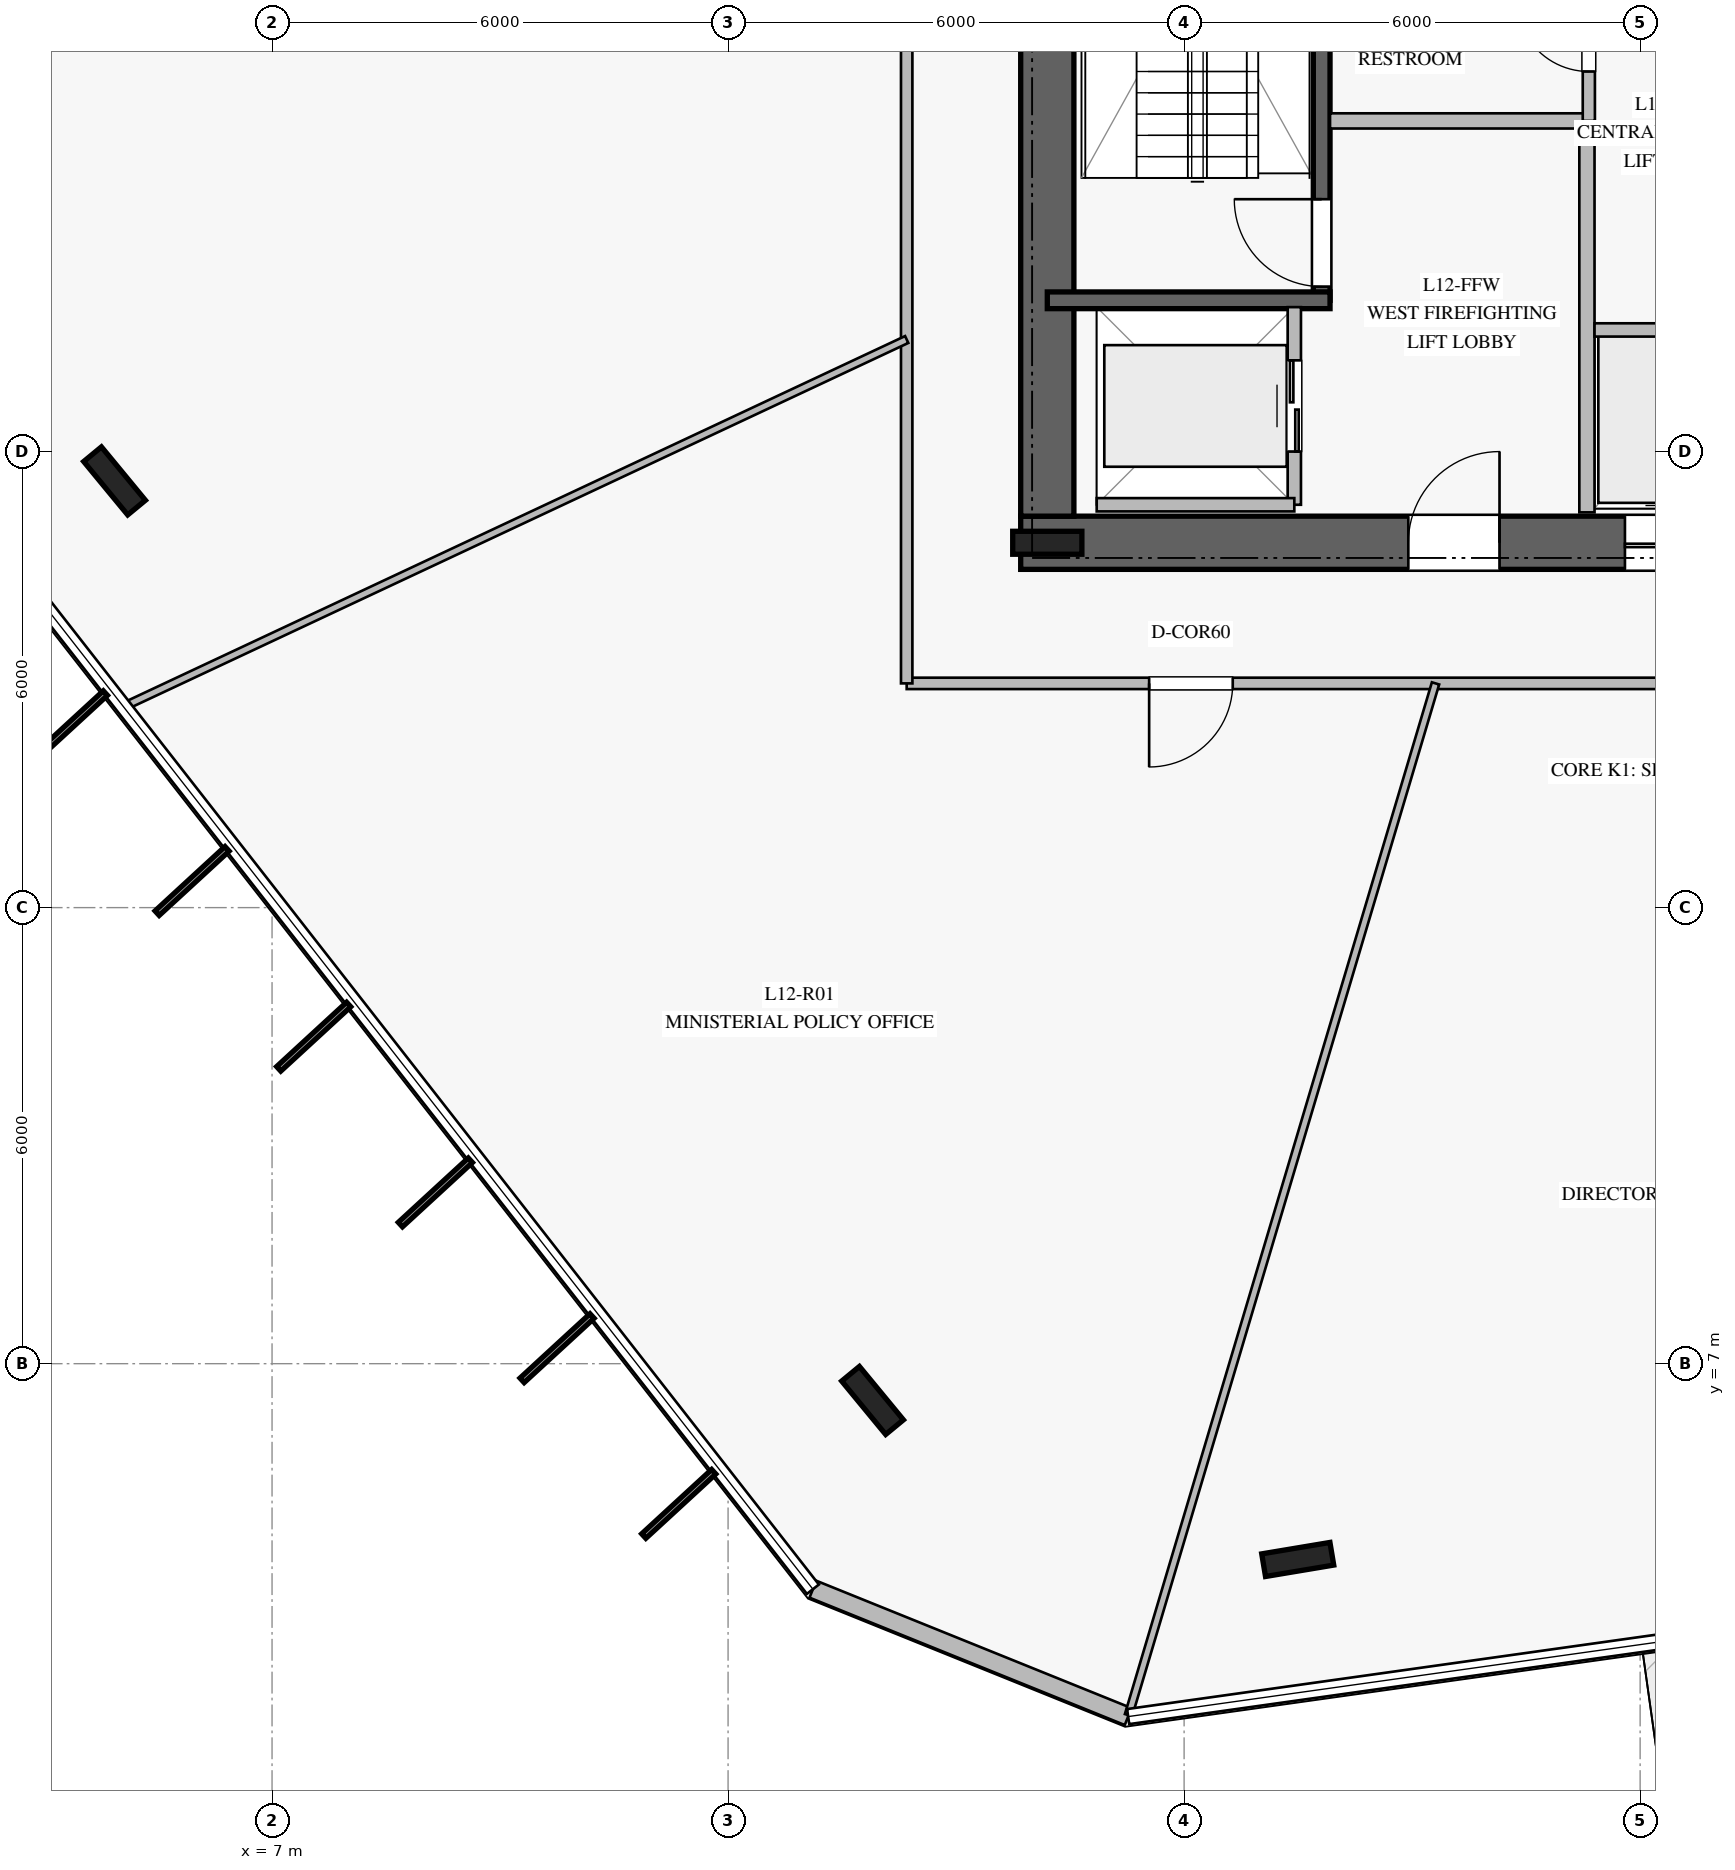
"""IFC4 building model, lengths in metres.
Left out: names, types, materials, properties, quantities, classifications, styles, units other than length and angle.
Written with IfcOpenShell. Run it as: python <this file> out.ifc"""

import sys

from ifc_helpers import new_model, si_unit, direction, frame, frame_2d, origin, origin_2d, place, context, subcontext, project, spatial, rectangle, i_section, extrude, element, fill, save


model = new_model("IFC4")
c1 = context("Model", 3, precision=1e-05, world=origin(), true_north=direction((0.0, 1.0)))
c2 = subcontext(c1, "Body", "Model", "MODEL_VIEW")
j1 = project(units=[si_unit("LENGTHUNIT", "METRE"), si_unit("PLANEANGLEUNIT", "RADIAN")], contexts=[c1])
p1 = place(None, origin())
s1 = spatial("IfcSite", under=j1, at=p1, CompositionType="ELEMENT")
p2 = place(p1, origin())
s2 = spatial("IfcBuilding", under=s1, at=p2, CompositionType="ELEMENT")
p3 = place(p2, frame((0.0, 0.0, 52.0)))
s3 = spatial("IfcBuildingStorey", under=s2, at=p3, CompositionType="ELEMENT", Elevation=52.0)
p4 = place(p3, frame((16.85, 17.8, 0.0), z_axis=(0.0, 0.0, 1.0), x_axis=(1.0, 0.0, 0.0)))
e1 = element("IfcWall", 1, at=p4, inside=s3, PredefinedType="SHEAR", context=c2, shape_type="SweptSolid", body=[
    extrude(rectangle(XDim=16.3, YDim=0.7, at=frame_2d((8.15, 0.0))), origin(), (0.0, 0.0, 1.0), 3.76),
])
p5 = place(p4, frame((5.1, 0.0, 0.0)))
e2 = element("IfcOpeningElement", 2, at=p5, cuts=e1, PredefinedType="OPENING", context=c2, shape_type="SweptSolid", body=[
    extrude(rectangle(XDim=1.2, YDim=2.25, at=frame_2d((0.6, 1.125))), frame((0.0, 0.36, 0.0), z_axis=(0.0, -1.0, 0.0), x_axis=(1.0, 0.0, 0.0)), (0.0, 0.0, 1.0), 0.72),
])
p6 = place(p4, frame((14.05, 0.0, 0.0)))
e3 = element("IfcOpeningElement", 3, at=p6, cuts=e1, PredefinedType="OPENING", context=c2, shape_type="SweptSolid", body=[
    extrude(rectangle(XDim=0.9, YDim=2.1, at=frame_2d((0.45, 1.05))), frame((0.0, 0.36, 0.0), z_axis=(0.0, -1.0, 0.0), x_axis=(1.0, 0.0, 0.0)), (0.0, 0.0, 1.0), 0.72),
])
p7 = place(p4, frame((7.95, 0.0, 0.0)))
e4 = element("IfcOpeningElement", 4, at=p7, cuts=e1, PredefinedType="OPENING", context=c2, shape_type="SweptSolid", body=[
    extrude(rectangle(XDim=1.1, YDim=2.2, at=frame_2d((0.55, 1.1))), frame((0.0, 0.36, 0.0), z_axis=(0.0, -1.0, 0.0), x_axis=(1.0, 0.0, 0.0)), (0.0, 0.0, 1.0), 0.72),
])
p8 = place(p4, frame((9.925, 0.0, 0.0)))
e5 = element("IfcOpeningElement", 5, at=p8, cuts=e1, PredefinedType="OPENING", context=c2, shape_type="SweptSolid", body=[
    extrude(rectangle(XDim=1.1, YDim=2.2, at=frame_2d((0.55, 1.1))), frame((0.0, 0.36, 0.0), z_axis=(0.0, -1.0, 0.0), x_axis=(1.0, 0.0, 0.0)), (0.0, 0.0, 1.0), 0.72),
])
p9 = place(p4, frame((11.9, 0.0, 0.0)))
e6 = element("IfcOpeningElement", 6, at=p9, cuts=e1, PredefinedType="OPENING", context=c2, shape_type="SweptSolid", body=[
    extrude(rectangle(XDim=1.1, YDim=2.2, at=frame_2d((0.55, 1.1))), frame((0.0, 0.36, 0.0), z_axis=(0.0, -1.0, 0.0), x_axis=(1.0, 0.0, 0.0)), (0.0, 0.0, 1.0), 0.72),
])
p10 = place(p3, frame((17.2, 31.85, 0.0), z_axis=(0.0, 0.0, 1.0), x_axis=(0.0, -1.0, 0.0)))
e7 = element("IfcWall", 7, at=p10, inside=s3, PredefinedType="SHEAR", context=c2, shape_type="SweptSolid", body=[
    extrude(rectangle(XDim=13.7, YDim=0.7, at=frame_2d((6.85, 0.0))), origin(), (0.0, 0.0, 1.0), 3.76),
])
p11 = place(p10, frame((2.0, 0.0, 0.0)))
e8 = element("IfcOpeningElement", 8, at=p11, cuts=e7, PredefinedType="OPENING", context=c2, shape_type="SweptSolid", body=[
    extrude(rectangle(XDim=1.5, YDim=2.2, at=frame_2d((0.75, 1.1))), frame((0.0, 0.36, 0.0), z_axis=(0.0, -1.0, 0.0), x_axis=(1.0, 0.0, 0.0)), (0.0, 0.0, 1.0), 0.72),
])
p12 = place(p3, frame((17.2, 17.8, 0.0), z_axis=(0.0, 0.0, 1.0), x_axis=(1.0, 0.0, 0.0)))
e9 = element("IfcColumn", 9, at=p12, inside=s3, PredefinedType="COLUMN", context=c2, shape_type="SweptSolid", body=[
    extrude(i_section(OverallWidth=0.302, OverallDepth=0.91, WebThickness=0.021, FlangeThickness=0.04, at=origin_2d()), origin(), (0.0, 0.0, 1.0), 4.0),
])
p13 = place(p3, frame((20.81, 20.99, 0.0), z_axis=(0.0, 0.0, 1.0), x_axis=(0.0, 1.0, 0.0)))
e10 = element("IfcWall", 10, at=p13, inside=s3, PredefinedType="SOLIDWALL", context=c2, shape_type="SweptSolid", body=[
    extrude(rectangle(XDim=7.22, YDim=0.22, at=frame_2d((3.61, 0.0))), origin(), (0.0, 0.0, 1.0), 3.76),
])
p14 = place(p13, frame((0.18, 0.0, 0.0)))
e11 = element("IfcOpeningElement", 11, at=p14, cuts=e10, PredefinedType="OPENING", context=c2, shape_type="SweptSolid", body=[
    extrude(rectangle(XDim=1.15, YDim=2.2, at=frame_2d((0.575, 1.1))), frame((0.0, 0.12, 0.0), z_axis=(0.0, -1.0, 0.0), x_axis=(1.0, 0.0, 0.0)), (0.0, 0.0, 1.0), 0.24),
])
p15 = place(p3, frame((17.2, 20.99, 0.0), z_axis=(0.0, 0.0, 1.0), x_axis=(1.0, 0.0, 0.0)))
e12 = element("IfcWall", 12, at=p15, inside=s3, PredefinedType="SOLIDWALL", context=c2, shape_type="SweptSolid", body=[
    extrude(rectangle(XDim=3.72, YDim=0.22, at=frame_2d((1.86, 0.0))), origin(), (0.0, 0.0, 1.0), 3.76),
])
for number, where, z_axis, x_axis in (
    (13, (3.943, 24.504, 0.0), (0.0, 0.0, 1.0), (0.35, 0.937, 0.0)),
    (14, (4.928, 18.614, 0.0), (0.0, 0.0, 1.0), (-0.636, 0.772, 0.0)),
    (15, (14.901, 6.516, 0.0), (0.0, 0.0, 1.0), (-0.636, 0.772, 0.0)),
    (16, (20.495, 4.424, 0.0), (0.0, 0.0, 1.0), (0.986, 0.165, 0.0)),
):
    element("IfcColumn", number, at=place(p3, frame(where, z_axis=z_axis, x_axis=x_axis)), inside=s3, PredefinedType="COLUMN", context=c2, shape_type="SweptSolid", body=[
        extrude(i_section(OverallWidth=0.302, OverallDepth=0.91, WebThickness=0.021, FlangeThickness=0.04, at=origin_2d()), origin(), (0.0, 0.0, 1.0), 4.0),
    ])
p16 = place(p3, frame((14.116, 4.033, 0.0), z_axis=(0.0, 0.0, 1.0), x_axis=(0.927172587255, -0.374634479783, 0.0)))
e17 = element("IfcWall", 17, at=p16, inside=s3, PredefinedType="STANDARD", context=c2, shape_type="SweptSolid", body=[
    extrude(rectangle(XDim=4.474, YDim=0.24, at=frame_2d((2.237, 0.0))), origin(), (0.0, 0.0, 1.0), 3.76),
])
p17 = place(p3, frame((24.3, 18.2, 0.0), z_axis=(0.0, 0.0, 1.0), x_axis=(0.0, 1.0, 0.0)))
e18 = element("IfcWall", 18, at=p17, inside=s3, PredefinedType="PARTITIONING", context=c2, shape_type="SweptSolid", body=[
    extrude(rectangle(XDim=5.15, YDim=0.2, at=frame_2d((2.575, 0.0))), origin(), (0.0, 0.0, 1.0), 3.76),
])
p18 = place(p3, frame((20.92, 23.35, 0.0), z_axis=(0.0, 0.0, 1.0), x_axis=(1.0, 0.0, 0.0)))
e19 = element("IfcWall", 19, at=p18, inside=s3, PredefinedType="PARTITIONING", context=c2, shape_type="SweptSolid", body=[
    extrude(rectangle(XDim=3.38, YDim=0.2, at=frame_2d((1.69, 0.0))), origin(), (0.0, 0.0, 1.0), 3.76),
])
p19 = place(p3, frame((24.325, 23.35, 0.0), z_axis=(0.0, 0.0, 1.0), x_axis=(0.0, 1.0, 0.0)))
e20 = element("IfcWall", 20, at=p19, inside=s3, PredefinedType="PLUMBINGWALL", context=c2, shape_type="SweptSolid", body=[
    extrude(rectangle(XDim=4.93, YDim=0.16, at=frame_2d((2.465, 0.0))), origin(), (0.0, 0.0, 1.0), 3.76),
])
p20 = place(p19, frame((0.65, 0.0, 0.0)))
e21 = element("IfcOpeningElement", 21, at=p20, cuts=e20, PredefinedType="OPENING", context=c2, shape_type="SweptSolid", body=[
    extrude(rectangle(XDim=0.95, YDim=2.1, at=frame_2d((0.475, 1.05))), frame((0.0, 0.09, 0.0), z_axis=(0.0, -1.0, 0.0), x_axis=(1.0, 0.0, 0.0)), (0.0, 0.0, 1.0), 0.18),
])
p21 = place(p19, frame((3.11, 0.0, 0.0)))
e22 = element("IfcOpeningElement", 22, at=p21, cuts=e20, PredefinedType="OPENING", context=c2, shape_type="SweptSolid", body=[
    extrude(rectangle(XDim=0.9, YDim=2.1, at=frame_2d((0.45, 1.05))), frame((0.0, 0.09, 0.0), z_axis=(0.0, -1.0, 0.0), x_axis=(1.0, 0.0, 0.0)), (0.0, 0.0, 1.0), 0.18),
])
p22 = place(p3, frame((24.4, 20.6, 0.0), z_axis=(0.0, 0.0, 1.0), x_axis=(1.0, 0.0, 0.0)))
e23 = element("IfcWall", 23, at=p22, inside=s3, PredefinedType="PARTITIONING", context=c2, shape_type="SweptSolid", body=[
    extrude(rectangle(XDim=1.9, YDim=0.175, at=frame_2d((0.95, 0.0))), origin(), (0.0, 0.0, 1.0), 3.76),
])
p23 = place(p3, frame((20.45, 18.3, 0.0), z_axis=(0.0, 0.0, 1.0), x_axis=(0.0, 1.0, 0.0)))
e24 = element("IfcWall", 24, at=p23, inside=s3, PredefinedType="PARTITIONING", context=c2, shape_type="SweptSolid", body=[
    extrude(rectangle(XDim=2.6, YDim=0.175, at=frame_2d((1.3, 0.0))), origin(), (0.0, 0.0, 1.0), 3.76),
])
p24 = place(p23, frame((0.7, 0.0, 0.0)))
e25 = element("IfcOpeningElement", 25, at=p24, cuts=e24, PredefinedType="OPENING", context=c2, shape_type="SweptSolid", body=[
    extrude(rectangle(XDim=1.2, YDim=2.2, at=frame_2d((0.6, 1.1))), frame((0.0, 0.098, 0.0), z_axis=(0.0, -1.0, 0.0), x_axis=(1.0, 0.0, 0.0)), (0.0, 0.0, 1.0), 0.195),
])
p25 = place(p3, frame((17.85, 18.3, 0.0), z_axis=(0.0, 0.0, 1.0), x_axis=(1.0, 0.0, 0.0)))
e26 = element("IfcWall", 26, at=p25, inside=s3, PredefinedType="PARTITIONING", context=c2, shape_type="SweptSolid", body=[
    extrude(rectangle(XDim=2.6, YDim=0.175, at=frame_2d((1.3, 0.0))), origin(), (0.0, 0.0, 1.0), 3.76),
])
p26 = place(p3, frame((34.65, 15.95, 0.0), z_axis=(0.0, 0.0, 1.0), x_axis=(-1.0, 0.0, 0.0)))
e27 = element("IfcWall", 27, at=p26, inside=s3, PredefinedType="PARTITIONING", context=c2, shape_type="SweptSolid", body=[
    extrude(rectangle(XDim=19.3, YDim=0.15, at=frame_2d((9.65, 0.0))), origin(), (0.0, 0.0, 1.0), 3.21),
])
p27 = place(p26, frame((15.01, 0.0, 0.0)))
e28 = element("IfcOpeningElement", 28, at=p27, cuts=e27, PredefinedType="OPENING", context=c2, shape_type="SweptSolid", body=[
    extrude(rectangle(XDim=1.1, YDim=2.2, at=frame_2d((0.55, 1.1))), frame((0.0, 0.085, 0.0), z_axis=(0.0, -1.0, 0.0), x_axis=(1.0, 0.0, 0.0)), (0.0, 0.0, 1.0), 0.17),
])
p28 = place(p26, frame((6.126, 0.0, 0.0)))
e29 = element("IfcOpeningElement", 29, at=p28, cuts=e27, PredefinedType="OPENING", context=c2, shape_type="SweptSolid", body=[
    extrude(rectangle(XDim=1.1, YDim=2.2, at=frame_2d((0.55, 1.1))), frame((0.0, 0.085, 0.0), z_axis=(0.0, -1.0, 0.0), x_axis=(1.0, 0.0, 0.0)), (0.0, 0.0, 1.0), 0.17),
])
p29 = place(p3, frame((15.35, 15.95, 0.0), z_axis=(0.0, 0.0, 1.0), x_axis=(0.0, 1.0, 0.0)))
e30 = element("IfcWall", 30, at=p29, inside=s3, PredefinedType="PARTITIONING", context=c2, shape_type="SweptSolid", body=[
    extrude(rectangle(XDim=18.1, YDim=0.15, at=frame_2d((9.05, 0.0))), origin(), (0.0, 0.0, 1.0), 3.21),
])
p30 = place(p29, frame((9.612, 0.0, 0.0)))
e31 = element("IfcOpeningElement", 31, at=p30, cuts=e30, PredefinedType="OPENING", context=c2, shape_type="SweptSolid", body=[
    extrude(rectangle(XDim=1.1, YDim=2.2, at=frame_2d((0.55, 1.1))), frame((0.0, 0.085, 0.0), z_axis=(0.0, -1.0, 0.0), x_axis=(1.0, 0.0, 0.0)), (0.0, 0.0, 1.0), 0.17),
])
p31 = place(p3, frame((15.35, 20.474, 0.0), z_axis=(0.0, 0.0, 1.0), x_axis=(-0.905402160526, -0.42455497608, 0.0)))
e32 = element("IfcWall", 32, at=p31, inside=s3, PredefinedType="MOVABLE", context=c2, shape_type="SweptSolid", body=[
    extrude(rectangle(XDim=11.363, YDim=0.1, at=frame_2d((5.682, 0.0))), origin(), (0.0, 0.0, 1.0), 3.06),
])
p32 = place(p3, frame((22.308, 15.95, 0.0), z_axis=(0.0, 0.0, 1.0), x_axis=(-0.285200995496, -0.958467731417, 0.0)))
e33 = element("IfcWall", 33, at=p32, inside=s3, PredefinedType="MOVABLE", context=c2, shape_type="SweptSolid", body=[
    extrude(rectangle(XDim=14.162, YDim=0.1, at=frame_2d((7.081, 0.0))), origin(), (0.0, 0.0, 1.0), 3.06),
])
p33 = place(p14, origin())
e34 = element("IfcDoor", 34, at=p33, inside=s3, OperationType="SINGLE_SWING_RIGHT", PredefinedType="DOOR", context=c2, shape_type="SweptSolid", body=[
    extrude(rectangle(XDim=1.15, YDim=2.2, at=frame_2d((0.575, 1.1))), frame((0.0, 0.025, 0.0), z_axis=(0.0, -1.0, 0.0), x_axis=(1.0, 0.0, 0.0)), (0.0, 0.0, 1.0), 0.05),
])
fill(e11, e34)
p34 = place(p5, origin())
e35 = element("IfcDoor", 35, at=p34, inside=s3, OperationType="SINGLE_SWING_RIGHT", PredefinedType="DOOR", context=c2, shape_type="SweptSolid", body=[
    extrude(rectangle(XDim=1.2, YDim=2.25, at=frame_2d((0.6, 1.125))), frame((0.0, 0.025, 0.0), z_axis=(0.0, -1.0, 0.0), x_axis=(1.0, 0.0, 0.0)), (0.0, 0.0, 1.0), 0.05),
])
fill(e2, e35)
p35 = place(p20, origin())
e36 = element("IfcDoor", 36, at=p35, inside=s3, OperationType="SINGLE_SWING_RIGHT", PredefinedType="DOOR", context=c2, shape_type="SweptSolid", body=[
    extrude(rectangle(XDim=0.95, YDim=2.1, at=frame_2d((0.475, 1.05))), frame((0.0, 0.025, 0.0), z_axis=(0.0, -1.0, 0.0), x_axis=(1.0, 0.0, 0.0)), (0.0, 0.0, 1.0), 0.05),
])
fill(e21, e36)
p36 = place(p7, origin())
e37 = element("IfcDoor", 37, at=p36, inside=s3, OperationType="DOUBLE_DOOR_SLIDING", PredefinedType="DOOR", context=c2, shape_type="SweptSolid", body=[
    extrude(rectangle(XDim=1.1, YDim=2.2, at=frame_2d((0.55, 1.1))), frame((0.0, 0.025, 0.0), z_axis=(0.0, -1.0, 0.0), x_axis=(1.0, 0.0, 0.0)), (0.0, 0.0, 1.0), 0.05),
])
fill(e4, e37)
p37 = place(p24, origin())
e38 = element("IfcDoor", 38, at=p37, inside=s3, OperationType="DOUBLE_DOOR_SLIDING", PredefinedType="DOOR", context=c2, shape_type="SweptSolid", body=[
    extrude(rectangle(XDim=1.2, YDim=2.2, at=frame_2d((0.6, 1.1))), frame((0.0, 0.025, 0.0), z_axis=(0.0, -1.0, 0.0), x_axis=(1.0, 0.0, 0.0)), (0.0, 0.0, 1.0), 0.05),
])
fill(e25, e38)
p38 = place(p27, origin())
e39 = element("IfcDoor", 39, at=p38, inside=s3, OperationType="SINGLE_SWING_RIGHT", PredefinedType="DOOR", context=c2, shape_type="SweptSolid", body=[
    extrude(rectangle(XDim=1.1, YDim=2.2, at=frame_2d((0.55, 1.1))), frame((0.0, 0.025, 0.0), z_axis=(0.0, -1.0, 0.0), x_axis=(1.0, 0.0, 0.0)), (0.0, 0.0, 1.0), 0.05),
])
fill(e28, e39)
save(model, sys.argv[1])
